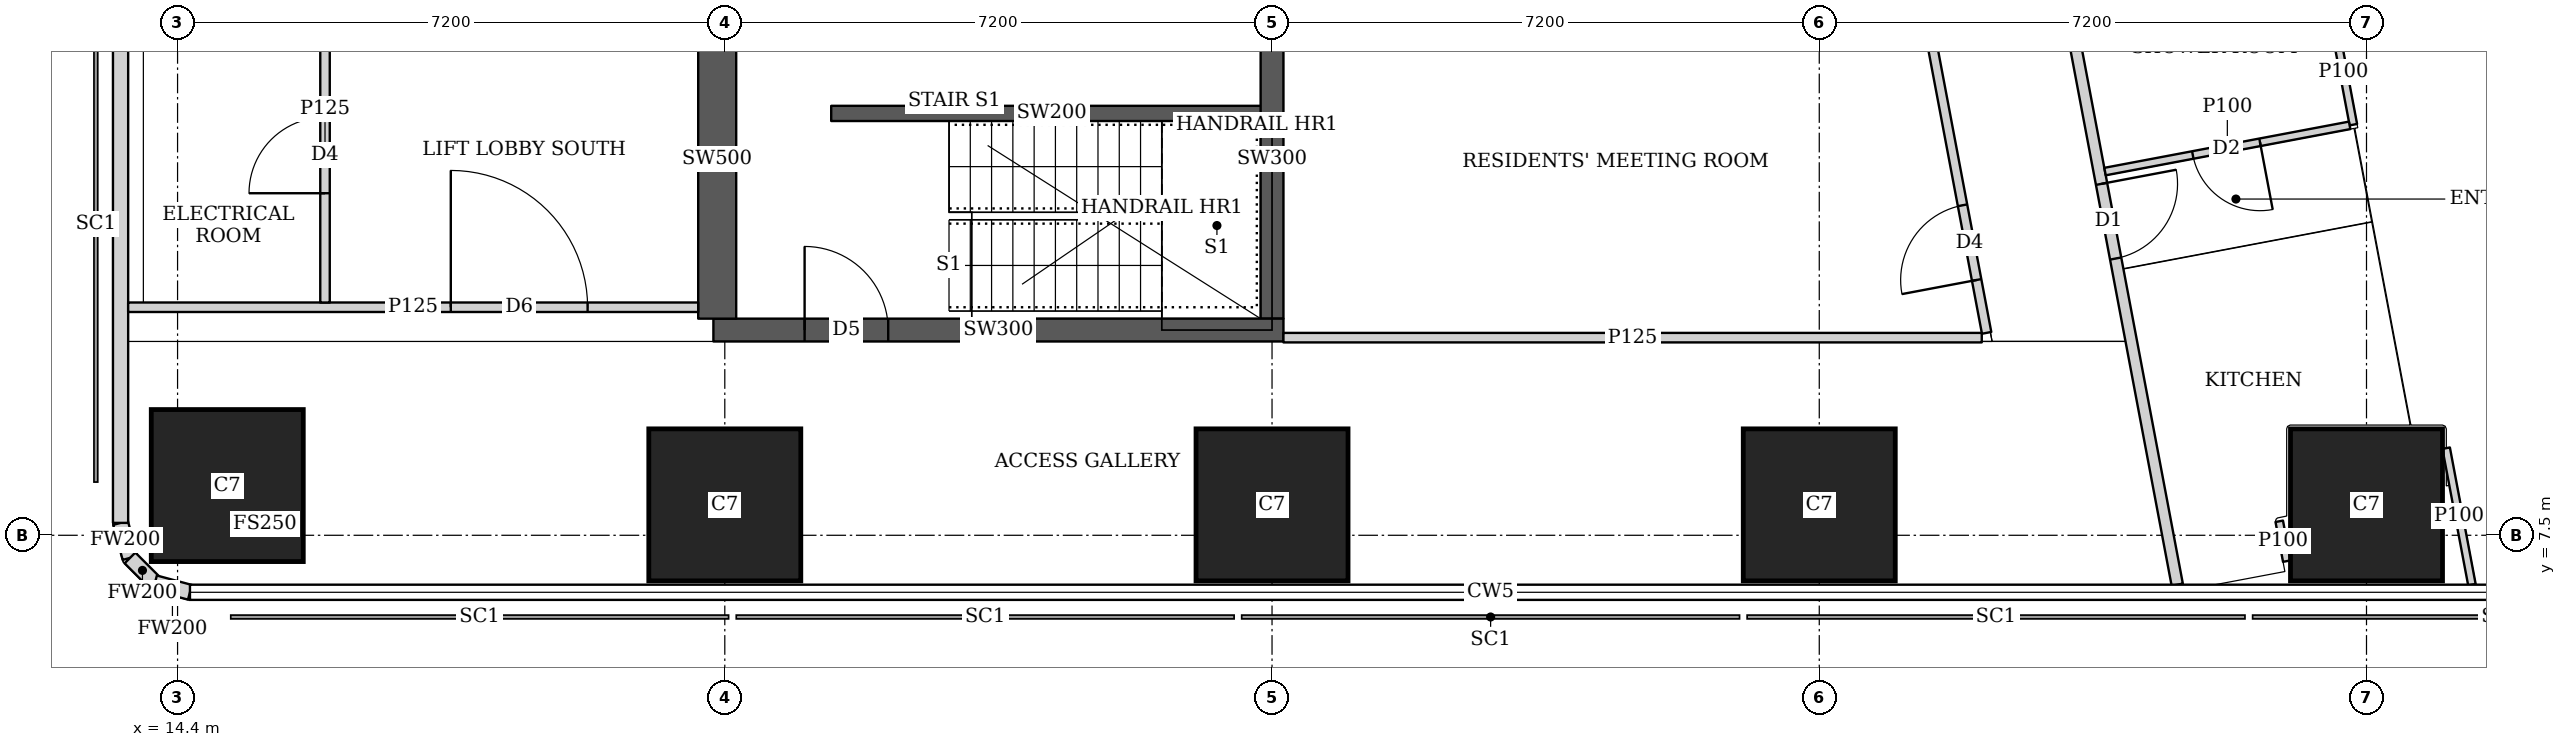
"""IFC4 building model, lengths in metres.
Left out: names, types, materials, properties, quantities, classifications, styles, units other than length and angle.
Written with IfcOpenShell. Run it as: python <this file> out.ifc"""

import sys

from ifc_helpers import new_model, si_unit, direction, frame, frame_2d, origin, origin_2d, place, context, subcontext, project, spatial, rectangle, extrude, element, fill, save


model = new_model("IFC4")
c1 = context("Model", 3, precision=1e-05, world=origin(), true_north=direction((0.0, 1.0)))
c2 = subcontext(c1, "Body", "Model", "MODEL_VIEW")
j1 = project(units=[si_unit("LENGTHUNIT", "METRE"), si_unit("PLANEANGLEUNIT", "RADIAN")], contexts=[c1])
p1 = place(None, origin())
s1 = spatial("IfcSite", under=j1, at=p1, CompositionType="ELEMENT")
p2 = place(p1, origin())
s2 = spatial("IfcBuilding", under=s1, at=p2, CompositionType="ELEMENT")
p3 = place(p2, frame((0.0, 0.0, 270.35)))
s3 = spatial("IfcBuildingStorey", under=s2, at=p3, CompositionType="ELEMENT", Elevation=270.35)
for number, where, z_axis, x_axis in (
    (1, (15.054, 8.154, 0.0), (0.0, 0.0, 1.0), (1.0, 0.0, 0.0)),
    (2, (21.6, 7.9, 0.0), (0.0, 0.0, 1.0), (1.0, 0.0, 0.0)),
    (3, (28.8, 7.9, 0.0), (0.0, 0.0, 1.0), (1.0, 0.0, 0.0)),
    (4, (36.0, 7.9, 0.0), (0.0, 0.0, 1.0), (1.0, 0.0, 0.0)),
    (5, (43.2, 7.9, 0.0), (0.0, 0.0, 1.0), (1.0, 0.0, 0.0)),
):
    element("IfcColumn", number, at=place(p3, frame(where, z_axis=z_axis, x_axis=x_axis)), inside=s3, PredefinedType="COLUMN", context=c2, shape_type="SweptSolid", body=[
        extrude(rectangle(XDim=2.0, YDim=2.0, at=origin_2d()), origin(), (0.0, 0.0, 1.0), 3.75),
    ])
p4 = place(p3, frame((21.45, 10.2, 0.0), z_axis=(0.0, 0.0, 1.0), x_axis=(1.0, 0.0, 0.0)))
e6 = element("IfcWall", 6, at=p4, inside=s3, PredefinedType="SHEAR", context=c2, shape_type="SweptSolid", body=[
    extrude(rectangle(XDim=7.5, YDim=0.3, at=frame_2d((3.75, 0.0))), origin(), (0.0, 0.0, 1.0), 3.75),
])
p5 = place(p4, frame((1.2, 0.0, 0.0)))
e7 = element("IfcOpeningElement", 7, at=p5, cuts=e6, PredefinedType="OPENING", context=c2, shape_type="SweptSolid", body=[
    extrude(rectangle(XDim=1.1, YDim=2.1, at=frame_2d((0.55, 1.05))), frame((0.0, 0.16, 0.0), z_axis=(0.0, -1.0, 0.0), x_axis=(1.0, 0.0, 0.0)), (0.0, 0.0, 1.0), 0.32),
])
p6 = place(p3, frame((21.5, 10.35, 0.0), z_axis=(0.0, 0.0, 1.0), x_axis=(0.0, 1.0, 0.0)))
e8 = element("IfcWall", 8, at=p6, inside=s3, PredefinedType="SHEAR", context=c2, shape_type="SweptSolid", body=[
    extrude(rectangle(XDim=4.2, YDim=0.5, at=frame_2d((2.1, 0.0))), origin(), (0.0, 0.0, 1.0), 3.75),
])
p7 = place(p3, frame((28.8, 10.35, 0.0), z_axis=(0.0, 0.0, 1.0), x_axis=(0.0, 1.0, 0.0)))
e9 = element("IfcWall", 9, at=p7, inside=s3, PredefinedType="SHEAR", context=c2, shape_type="SweptSolid", body=[
    extrude(rectangle(XDim=4.2, YDim=0.3, at=frame_2d((2.1, 0.0))), origin(), (0.0, 0.0, 1.0), 3.75),
])
p8 = place(p3, frame((49.684, 7.832, 0.0), z_axis=(0.0, 0.0, 1.0), x_axis=(-0.185616669694, 0.982622232565, 0.0)))
e10 = element("IfcWall", 10, at=p8, inside=s3, PredefinedType="SOLIDWALL", context=c2, shape_type="SweptSolid", body=[
    extrude(rectangle(XDim=36.0, YDim=0.2, at=frame_2d((18.0, 0.0))), origin(), (0.0, 0.0, 1.0), 3.5),
])
p9 = place(p8, frame((2.518, 0.0, 0.9)))
e11 = element("IfcOpeningElement", 11, at=p9, cuts=e10, PredefinedType="OPENING", context=c2, shape_type="SweptSolid", body=[
    extrude(rectangle(XDim=2.4, YDim=1.5, at=frame_2d((1.2, 0.75))), frame((0.0, 0.11, 0.0), z_axis=(0.0, -1.0, 0.0), x_axis=(1.0, 0.0, 0.0)), (0.0, 0.0, 1.0), 0.22),
])
p10 = place(p8, frame((8.444, 0.0, 0.9)))
e12 = element("IfcOpeningElement", 12, at=p10, cuts=e10, PredefinedType="OPENING", context=c2, shape_type="SweptSolid", body=[
    extrude(rectangle(XDim=1.8, YDim=1.5, at=frame_2d((0.9, 0.75))), frame((0.0, 0.11, 0.0), z_axis=(0.0, -1.0, 0.0), x_axis=(1.0, 0.0, 0.0)), (0.0, 0.0, 1.0), 0.22),
])
p11 = place(p8, frame((12.261, 0.0, 0.9)))
e13 = element("IfcOpeningElement", 13, at=p11, cuts=e10, PredefinedType="OPENING", context=c2, shape_type="SweptSolid", body=[
    extrude(rectangle(XDim=1.8, YDim=1.5, at=frame_2d((0.9, 0.75))), frame((0.0, 0.11, 0.0), z_axis=(0.0, -1.0, 0.0), x_axis=(1.0, 0.0, 0.0)), (0.0, 0.0, 1.0), 0.22),
])
p12 = place(p8, frame((16.078, 0.0, 0.9)))
e14 = element("IfcOpeningElement", 14, at=p12, cuts=e10, PredefinedType="OPENING", context=c2, shape_type="SweptSolid", body=[
    extrude(rectangle(XDim=1.8, YDim=1.5, at=frame_2d((0.9, 0.75))), frame((0.0, 0.11, 0.0), z_axis=(0.0, -1.0, 0.0), x_axis=(1.0, 0.0, 0.0)), (0.0, 0.0, 1.0), 0.22),
])
p13 = place(p8, frame((19.894, 0.0, 0.9)))
e15 = element("IfcOpeningElement", 15, at=p13, cuts=e10, PredefinedType="OPENING", context=c2, shape_type="SweptSolid", body=[
    extrude(rectangle(XDim=1.8, YDim=1.5, at=frame_2d((0.9, 0.75))), frame((0.0, 0.11, 0.0), z_axis=(0.0, -1.0, 0.0), x_axis=(1.0, 0.0, 0.0)), (0.0, 0.0, 1.0), 0.22),
])
p14 = place(p8, frame((23.71, 0.0, 0.9)))
e16 = element("IfcOpeningElement", 16, at=p14, cuts=e10, PredefinedType="OPENING", context=c2, shape_type="SweptSolid", body=[
    extrude(rectangle(XDim=1.8, YDim=1.5, at=frame_2d((0.9, 0.75))), frame((0.0, 0.11, 0.0), z_axis=(0.0, -1.0, 0.0), x_axis=(1.0, 0.0, 0.0)), (0.0, 0.0, 1.0), 0.22),
])
p15 = place(p8, frame((27.526, 0.0, 0.9)))
e17 = element("IfcOpeningElement", 17, at=p15, cuts=e10, PredefinedType="OPENING", context=c2, shape_type="SweptSolid", body=[
    extrude(rectangle(XDim=1.8, YDim=1.5, at=frame_2d((0.9, 0.75))), frame((0.0, 0.11, 0.0), z_axis=(0.0, -1.0, 0.0), x_axis=(1.0, 0.0, 0.0)), (0.0, 0.0, 1.0), 0.22),
])
p16 = place(p8, frame((32.046, 0.0, 0.9)))
e18 = element("IfcOpeningElement", 18, at=p16, cuts=e10, PredefinedType="OPENING", context=c2, shape_type="SweptSolid", body=[
    extrude(rectangle(XDim=1.8, YDim=1.5, at=frame_2d((0.9, 0.75))), frame((0.0, 0.11, 0.0), z_axis=(0.0, -1.0, 0.0), x_axis=(1.0, 0.0, 0.0)), (0.0, 0.0, 1.0), 0.22),
])
p17 = place(p3, frame((13.65, 43.037, 0.0), z_axis=(0.0, 0.0, 1.0), x_axis=(0.0, -1.0, 0.0)))
e19 = element("IfcWall", 19, at=p17, inside=s3, PredefinedType="SOLIDWALL", context=c2, shape_type="SweptSolid", body=[
    extrude(rectangle(XDim=35.374, YDim=0.2, at=frame_2d((17.687, 0.0))), origin(), (0.0, 0.0, 1.0), 3.5),
])
p18 = place(p17, frame((1.959, 0.0, 0.9)))
e20 = element("IfcOpeningElement", 20, at=p18, cuts=e19, PredefinedType="OPENING", context=c2, shape_type="SweptSolid", body=[
    extrude(rectangle(XDim=1.8, YDim=1.5, at=frame_2d((0.9, 0.75))), frame((0.0, 0.11, 0.0), z_axis=(0.0, -1.0, 0.0), x_axis=(1.0, 0.0, 0.0)), (0.0, 0.0, 1.0), 0.22),
])
p19 = place(p3, frame((13.65, 7.663, 0.0), z_axis=(0.0, 0.0, 1.0), x_axis=(0.259698463175, -0.965689757751, 0.0)))
e21 = element("IfcWall", 21, at=p19, inside=s3, PredefinedType="SOLIDWALL", context=c2, shape_type="SweptSolid", body=[
    extrude(rectangle(XDim=0.478, YDim=0.2, at=frame_2d((0.239, 0.0))), origin(), (0.0, 0.0, 1.0), 3.5),
])
p20 = place(p3, frame((13.774, 7.202, 0.0), z_axis=(0.0, 0.0, 1.0), x_axis=(0.707369890659, -0.706843573776, 0.0)))
e22 = element("IfcWall", 22, at=p20, inside=s3, PredefinedType="SOLIDWALL", context=c2, shape_type="SweptSolid", body=[
    extrude(rectangle(XDim=0.464, YDim=0.2, at=frame_2d((0.232, 0.0))), origin(), (0.0, 0.0, 1.0), 3.5),
])
p21 = place(p3, frame((14.102, 6.874, 0.0), z_axis=(0.0, 0.0, 1.0), x_axis=(0.965655254015, -0.259826731483, 0.0)))
e23 = element("IfcWall", 23, at=p21, inside=s3, PredefinedType="SOLIDWALL", context=c2, shape_type="SweptSolid", body=[
    extrude(rectangle(XDim=0.477, YDim=0.2, at=frame_2d((0.239, 0.0))), origin(), (0.0, 0.0, 1.0), 3.5),
])
p22 = place(p3, frame((34.036, 42.186, 0.0), z_axis=(0.0, 0.0, 1.0), x_axis=(0.185593518645, -0.9826266055, 0.0)))
e24 = element("IfcWall", 24, at=p22, inside=s3, PredefinedType="SOLIDWALL", context=c2, shape_type="SweptSolid", body=[
    extrude(rectangle(XDim=35.961, YDim=0.15, at=frame_2d((17.98, 0.0))), origin(), (0.0, 0.0, 1.0), 2.5),
])
p23 = place(p22, frame((15.529, 0.0, 0.0)))
e25 = element("IfcOpeningElement", 25, at=p23, cuts=e24, PredefinedType="OPENING", context=c2, shape_type="SweptSolid", body=[
    extrude(rectangle(XDim=1.0, YDim=2.1, at=frame_2d((0.5, 1.05))), frame((0.0, 0.085, 0.0), z_axis=(0.0, -1.0, 0.0), x_axis=(1.0, 0.0, 0.0)), (0.0, 0.0, 1.0), 0.17),
])
p24 = place(p22, frame((19.345, 0.0, 0.0)))
e26 = element("IfcOpeningElement", 26, at=p24, cuts=e24, PredefinedType="OPENING", context=c2, shape_type="SweptSolid", body=[
    extrude(rectangle(XDim=1.0, YDim=2.1, at=frame_2d((0.5, 1.05))), frame((0.0, 0.085, 0.0), z_axis=(0.0, -1.0, 0.0), x_axis=(1.0, 0.0, 0.0)), (0.0, 0.0, 1.0), 0.17),
])
p25 = place(p22, frame((30.594, 0.0, 0.0)))
e27 = element("IfcOpeningElement", 27, at=p25, cuts=e24, PredefinedType="OPENING", context=c2, shape_type="SweptSolid", body=[
    extrude(rectangle(XDim=1.0, YDim=2.1, at=frame_2d((0.5, 1.05))), frame((0.0, 0.085, 0.0), z_axis=(0.0, -1.0, 0.0), x_axis=(1.0, 0.0, 0.0)), (0.0, 0.0, 1.0), 0.17),
])
p26 = place(p3, frame((44.248, 8.646, 0.0), z_axis=(0.0, 0.0, 1.0), x_axis=(0.185417594585, -0.982659816833, 0.0)))
e28 = element("IfcWall", 28, at=p26, inside=s3, PredefinedType="PARTITIONING", context=c2, shape_type="SweptSolid", body=[
    extrude(rectangle(XDim=1.828, YDim=0.1, at=frame_2d((0.914, 0.0))), origin(), (0.0, 0.0, 1.0), 2.05),
])
p27 = place(p3, frame((42.151, 7.16, 0.0), z_axis=(0.0, 0.0, 1.0), x_axis=(-0.185366164644, 0.982669519729, 0.0)))
e29 = element("IfcWall", 29, at=p27, inside=s3, PredefinedType="PARTITIONING", context=c2, shape_type="SweptSolid", body=[
    extrude(rectangle(XDim=0.533, YDim=0.1, at=frame_2d((0.267, 0.0))), origin(), (0.0, 0.0, 1.0), 2.5),
])
p28 = place(p3, frame((42.765, 14.29, 0.0), z_axis=(0.0, 0.0, 1.0), x_axis=(0.185634589628, -0.982618847333, 0.0)))
e30 = element("IfcWall", 30, at=p28, inside=s3, PredefinedType="PARTITIONING", context=c2, shape_type="SweptSolid", body=[
    extrude(rectangle(XDim=1.413, YDim=0.1, at=frame_2d((0.706, 0.0))), origin(), (0.0, 0.0, 1.0), 3.5),
])
p29 = place(p3, frame((42.978, 12.893, 0.0), z_axis=(0.0, 0.0, 1.0), x_axis=(-0.982607026909, -0.185697147715, 0.0)))
e31 = element("IfcWall", 31, at=p29, inside=s3, PredefinedType="PARTITIONING", context=c2, shape_type="SweptSolid", body=[
    extrude(rectangle(XDim=3.275, YDim=0.1, at=frame_2d((1.637, 0.0))), origin(), (0.0, 0.0, 1.0), 3.5),
])
p30 = place(p29, frame((1.2, 0.0, 0.0)))
e32 = element("IfcOpeningElement", 32, at=p30, cuts=e31, PredefinedType="OPENING", context=c2, shape_type="SweptSolid", body=[
    extrude(rectangle(XDim=0.9, YDim=2.1, at=frame_2d((0.45, 1.05))), frame((0.0, 0.06, 0.0), z_axis=(0.0, -1.0, 0.0), x_axis=(1.0, 0.0, 0.0)), (0.0, 0.0, 1.0), 0.12),
])
p31 = place(p3, frame((13.75, 10.5, 0.0), z_axis=(0.0, 0.0, 1.0), x_axis=(1.0, 0.0, 0.0)))
e33 = element("IfcWall", 33, at=p31, inside=s3, PredefinedType="PARTITIONING", context=c2, shape_type="SweptSolid", body=[
    extrude(rectangle(XDim=7.5, YDim=0.125, at=frame_2d((3.75, 0.0))), origin(), (0.0, 0.0, 1.0), 3.5),
])
p32 = place(p31, frame((4.245, 0.0, 0.0)))
e34 = element("IfcOpeningElement", 34, at=p32, cuts=e33, PredefinedType="OPENING", context=c2, shape_type="SweptSolid", body=[
    extrude(rectangle(XDim=1.8, YDim=2.1, at=frame_2d((0.9, 1.05))), frame((0.0, 0.073, 0.0), z_axis=(0.0, -1.0, 0.0), x_axis=(1.0, 0.0, 0.0)), (0.0, 0.0, 1.0), 0.145),
])
p33 = place(p3, frame((16.34, 10.562, 0.0), z_axis=(0.0, 0.0, 1.0), x_axis=(0.0, 1.0, 0.0)))
e35 = element("IfcWall", 35, at=p33, inside=s3, PredefinedType="PARTITIONING", context=c2, shape_type="SweptSolid", body=[
    extrude(rectangle(XDim=3.988, YDim=0.125, at=frame_2d((1.994, 0.0))), origin(), (0.0, 0.0, 1.0), 3.5),
])
p34 = place(p33, frame((1.438, 0.0, 0.0)))
e36 = element("IfcOpeningElement", 36, at=p34, cuts=e35, PredefinedType="OPENING", context=c2, shape_type="SweptSolid", body=[
    extrude(rectangle(XDim=1.0, YDim=2.1, at=frame_2d((0.5, 1.05))), frame((0.0, 0.073, 0.0), z_axis=(0.0, -1.0, 0.0), x_axis=(1.0, 0.0, 0.0)), (0.0, 0.0, 1.0), 0.145),
])
p35 = place(p3, frame((28.95, 10.1, 0.0), z_axis=(0.0, 0.0, 1.0), x_axis=(1.0, 0.0, 0.0)))
e37 = element("IfcWall", 37, at=p35, inside=s3, PredefinedType="PARTITIONING", context=c2, shape_type="SweptSolid", body=[
    extrude(rectangle(XDim=9.188, YDim=0.125, at=frame_2d((4.594, 0.0))), origin(), (0.0, 0.0, 1.0), 3.5),
])
p36 = place(p3, frame((38.202, 10.163, 0.0), z_axis=(0.0, 0.0, 1.0), x_axis=(-0.185610321132, 0.982623431783, 0.0)))
e38 = element("IfcWall", 38, at=p36, inside=s3, PredefinedType="PARTITIONING", context=c2, shape_type="SweptSolid", body=[
    extrude(rectangle(XDim=25.111, YDim=0.125, at=frame_2d((12.556, 0.0))), origin(), (0.0, 0.0, 1.0), 2.5),
])
p37 = place(p36, frame((0.708, 0.0, 0.0)))
e39 = element("IfcOpeningElement", 39, at=p37, cuts=e38, PredefinedType="OPENING", context=c2, shape_type="SweptSolid", body=[
    extrude(rectangle(XDim=1.0, YDim=2.1, at=frame_2d((0.5, 1.05))), frame((0.0, 0.073, 0.0), z_axis=(0.0, -1.0, 0.0), x_axis=(1.0, 0.0, 0.0)), (0.0, 0.0, 1.0), 0.145),
])
p38 = place(p36, frame((5.9, 0.0, 0.0)))
e40 = element("IfcOpeningElement", 40, at=p38, cuts=e38, PredefinedType="OPENING", context=c2, shape_type="SweptSolid", body=[
    extrude(rectangle(XDim=1.0, YDim=2.1, at=frame_2d((0.5, 1.05))), frame((0.0, 0.073, 0.0), z_axis=(0.0, -1.0, 0.0), x_axis=(1.0, 0.0, 0.0)), (0.0, 0.0, 1.0), 0.145),
])
p39 = place(p36, frame((13.378, 0.0, 0.0)))
e41 = element("IfcOpeningElement", 41, at=p39, cuts=e38, PredefinedType="OPENING", context=c2, shape_type="SweptSolid", body=[
    extrude(rectangle(XDim=1.0, YDim=2.1, at=frame_2d((0.5, 1.05))), frame((0.0, 0.073, 0.0), z_axis=(0.0, -1.0, 0.0), x_axis=(1.0, 0.0, 0.0)), (0.0, 0.0, 1.0), 0.145),
])
p40 = place(p36, frame((17.194, 0.0, 0.0)))
e42 = element("IfcOpeningElement", 42, at=p40, cuts=e38, PredefinedType="OPENING", context=c2, shape_type="SweptSolid", body=[
    extrude(rectangle(XDim=1.0, YDim=2.1, at=frame_2d((0.5, 1.05))), frame((0.0, 0.073, 0.0), z_axis=(0.0, -1.0, 0.0), x_axis=(1.0, 0.0, 0.0)), (0.0, 0.0, 1.0), 0.145),
])
p41 = place(p36, frame((21.15, 0.0, 0.0)))
e43 = element("IfcOpeningElement", 43, at=p41, cuts=e38, PredefinedType="OPENING", context=c2, shape_type="SweptSolid", body=[
    extrude(rectangle(XDim=1.0, YDim=2.1, at=frame_2d((0.5, 1.05))), frame((0.0, 0.073, 0.0), z_axis=(0.0, -1.0, 0.0), x_axis=(1.0, 0.0, 0.0)), (0.0, 0.0, 1.0), 0.145),
])
p42 = place(p3, frame((23.0, 13.05, 0.0), z_axis=(0.0, 0.0, 1.0), x_axis=(1.0, 0.0, 0.0)))
e44 = element("IfcWall", 44, at=p42, inside=s3, PredefinedType="SHEAR", context=c2, shape_type="SweptSolid", body=[
    extrude(rectangle(XDim=5.8, YDim=0.2, at=frame_2d((2.9, 0.0))), origin(), (0.0, 0.0, 1.0), 3.75),
])
p43 = place(p30, origin())
e45 = element("IfcDoor", 45, at=p43, inside=s3, OperationType="SINGLE_SWING_LEFT", PredefinedType="DOOR", context=c2, shape_type="SweptSolid", body=[
    extrude(rectangle(XDim=0.9, YDim=2.1, at=frame_2d((0.45, 1.05))), frame((0.0, 0.025, 0.0), z_axis=(0.0, -1.0, 0.0), x_axis=(1.0, 0.0, 0.0)), (0.0, 0.0, 1.0), 0.05),
])
fill(e32, e45)
p44 = place(p25, origin())
e46 = element("IfcDoor", 46, at=p44, inside=s3, OperationType="SINGLE_SWING_LEFT", PredefinedType="DOOR", context=c2, shape_type="SweptSolid", body=[
    extrude(rectangle(XDim=1.0, YDim=2.1, at=frame_2d((0.5, 1.05))), frame((0.0, 0.025, 0.0), z_axis=(0.0, -1.0, 0.0), x_axis=(1.0, 0.0, 0.0)), (0.0, 0.0, 1.0), 0.05),
])
fill(e27, e46)
p45 = place(p34, origin())
e47 = element("IfcDoor", 47, at=p45, inside=s3, OperationType="SINGLE_SWING_LEFT", PredefinedType="DOOR", context=c2, shape_type="SweptSolid", body=[
    extrude(rectangle(XDim=1.0, YDim=2.1, at=frame_2d((0.5, 1.05))), frame((0.0, 0.025, 0.0), z_axis=(0.0, -1.0, 0.0), x_axis=(1.0, 0.0, 0.0)), (0.0, 0.0, 1.0), 0.05),
])
fill(e36, e47)
p46 = place(p32, origin())
e48 = element("IfcDoor", 48, at=p46, inside=s3, OperationType="DOUBLE_DOOR_SINGLE_SWING", PredefinedType="DOOR", context=c2, shape_type="SweptSolid", body=[
    extrude(rectangle(XDim=1.8, YDim=2.1, at=frame_2d((0.9, 1.05))), frame((0.0, 0.025, 0.0), z_axis=(0.0, -1.0, 0.0), x_axis=(1.0, 0.0, 0.0)), (0.0, 0.0, 1.0), 0.05),
])
fill(e34, e48)
p47 = place(p37, origin())
e49 = element("IfcDoor", 49, at=p47, inside=s3, OperationType="SINGLE_SWING_LEFT", PredefinedType="DOOR", context=c2, shape_type="SweptSolid", body=[
    extrude(rectangle(XDim=1.0, YDim=2.1, at=frame_2d((0.5, 1.05))), frame((0.0, 0.025, 0.0), z_axis=(0.0, -1.0, 0.0), x_axis=(1.0, 0.0, 0.0)), (0.0, 0.0, 1.0), 0.05),
])
fill(e39, e49)
p48 = place(p5, origin())
e50 = element("IfcDoor", 50, at=p48, inside=s3, OperationType="SINGLE_SWING_LEFT", PredefinedType="DOOR", context=c2, shape_type="SweptSolid", body=[
    extrude(rectangle(XDim=1.1, YDim=2.1, at=frame_2d((0.55, 1.05))), frame((0.0, 0.025, 0.0), z_axis=(0.0, -1.0, 0.0), x_axis=(1.0, 0.0, 0.0)), (0.0, 0.0, 1.0), 0.05),
])
fill(e7, e50)
save(model, sys.argv[1])
